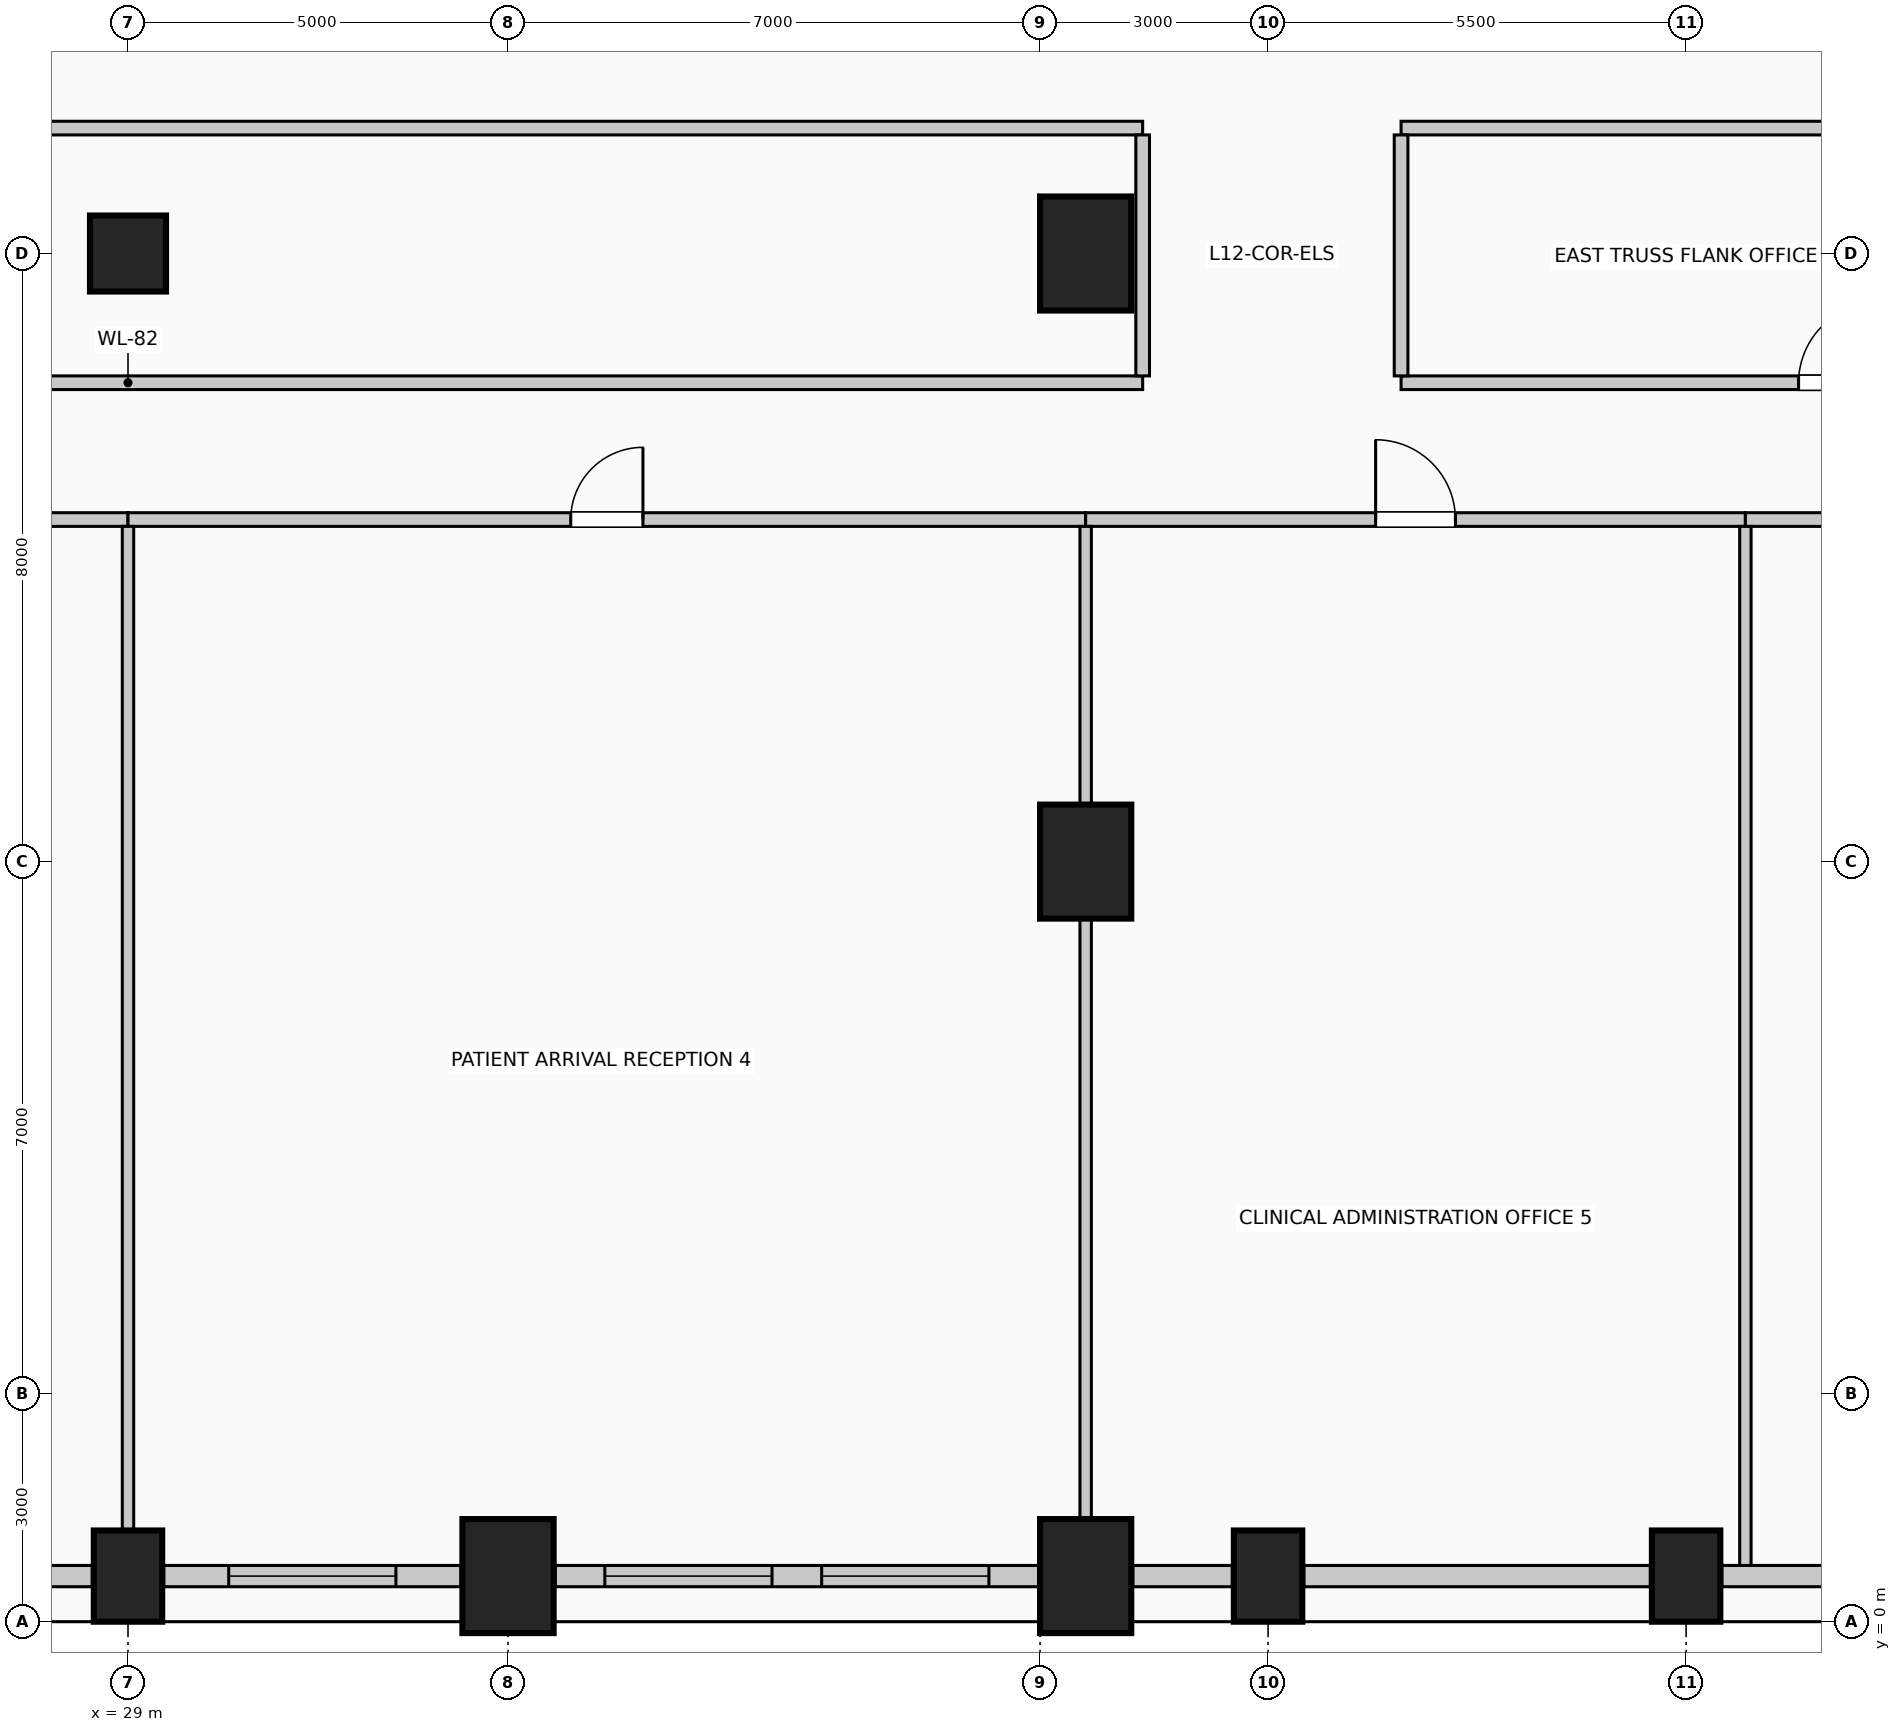
"""IFC4 building model, lengths in metres.
Left out: names, types, materials, properties, quantities, classifications, styles, units other than length and angle.
Written with IfcOpenShell. Run it as: python <this file> out.ifc"""

import sys

from ifc_helpers import new_model, si_unit, direction, frame, frame_2d, origin, origin_2d, place, context, subcontext, project, spatial, rectangle, circle, extrude, element, fill, save


model = new_model("IFC4")
c1 = context("Model", 3, precision=1e-05, world=origin(), true_north=direction((0.0, 1.0)))
c2 = subcontext(c1, "Body", "Model", "MODEL_VIEW")
j1 = project(units=[si_unit("LENGTHUNIT", "METRE"), si_unit("PLANEANGLEUNIT", "RADIAN")], contexts=[c1])
p1 = place(None, origin())
s1 = spatial("IfcSite", under=j1, at=p1, CompositionType="ELEMENT")
p2 = place(p1, origin())
s2 = spatial("IfcBuilding", under=s1, at=p2, CompositionType="ELEMENT")
p3 = place(p2, frame((0.0, 0.0, 50.6)))
s3 = spatial("IfcBuildingStorey", under=s2, at=p3, CompositionType="ELEMENT", Elevation=50.6)
p4 = place(p3, frame((29.0, 0.6, 0.0), z_axis=(0.0, 0.0, 1.0), x_axis=(1.0, 0.0, 0.0)))
e1 = element("IfcColumn", 1, at=p4, inside=s3, PredefinedType="COLUMN", context=c2, shape_type="SweptSolid", body=[
    extrude(rectangle(XDim=0.9, YDim=1.2, at=origin_2d()), origin(), (0.0, 0.0, 1.0), 4.0),
])
for number, where, z_axis, x_axis in (
    (2, (34.0, 0.6, 0.0), (0.0, 0.0, 1.0), (1.0, 0.0, 0.0)),
    (3, (41.6, 0.6, 0.0), (0.0, 0.0, 1.0), (1.0, 0.0, 0.0)),
):
    element("IfcColumn", number, at=place(p3, frame(where, z_axis=z_axis, x_axis=x_axis)), inside=s3, PredefinedType="COLUMN", context=c2, shape_type="SweptSolid", body=[
        extrude(rectangle(XDim=1.2, YDim=1.5, at=origin_2d()), origin(), (0.0, 0.0, 1.0), 4.0),
    ])
for number, where, z_axis, x_axis in (
    (4, (44.0, 0.6, 0.0), (0.0, 0.0, 1.0), (1.0, 0.0, 0.0)),
    (5, (49.5, 0.6, 0.0), (0.0, 0.0, 1.0), (1.0, 0.0, 0.0)),
):
    element("IfcColumn", number, at=place(p3, frame(where, z_axis=z_axis, x_axis=x_axis)), inside=s3, PredefinedType="COLUMN", context=c2, shape_type="SweptSolid", body=[
        extrude(rectangle(XDim=0.9, YDim=1.2, at=origin_2d()), origin(), (0.0, 0.0, 1.0), 4.0),
    ])
for number, where, z_axis, x_axis in (
    (6, (41.6, 10.0, 0.0), (0.0, 0.0, 1.0), (1.0, 0.0, 0.0)),
    (7, (41.6, 18.0, 0.0), (0.0, 0.0, 1.0), (1.0, 0.0, 0.0)),
):
    element("IfcColumn", number, at=place(p3, frame(where, z_axis=z_axis, x_axis=x_axis)), inside=s3, PredefinedType="COLUMN", context=c2, shape_type="SweptSolid", body=[
        extrude(rectangle(XDim=1.2, YDim=1.5, at=origin_2d()), origin(), (0.0, 0.0, 1.0), 4.0),
    ])
p5 = place(p3, frame((29.0, 18.0, 0.0), z_axis=(0.0, 0.0, 1.0), x_axis=(1.0, 0.0, 0.0)))
e8 = element("IfcColumn", 8, at=p5, inside=s3, PredefinedType="COLUMN", context=c2, shape_type="SweptSolid", body=[
    extrude(circle(Radius=0.5, at=origin_2d()), origin(), (0.0, 0.0, 1.0), 4.0),
])
p6 = place(p3, frame((28.53, 0.6, 0.0), z_axis=(0.0, 0.0, 1.0), x_axis=(-1.0, 0.0, 0.0)))
e9 = element("IfcWall", 9, at=p6, inside=s3, PredefinedType="SOLIDWALL", context=c2, shape_type="SweptSolid", body=[
    extrude(rectangle(XDim=3.91, YDim=0.28, at=frame_2d((1.955, 0.0))), origin(), (0.0, 0.0, 1.0), 2.85),
])
p7 = place(p6, frame((0.855, 0.0, 0.5)))
e10 = element("IfcOpeningElement", 10, at=p7, cuts=e9, PredefinedType="OPENING", context=c2, shape_type="SweptSolid", body=[
    extrude(rectangle(XDim=2.2, YDim=1.95, at=frame_2d((1.1, 0.975))), frame((0.0, 0.15, 0.0), z_axis=(0.0, -1.0, 0.0), x_axis=(1.0, 0.0, 0.0)), (0.0, 0.0, 1.0), 0.3),
])
p8 = place(p3, frame((33.38, 0.6, 0.0), z_axis=(0.0, 0.0, 1.0), x_axis=(-1.0, 0.0, 0.0)))
e11 = element("IfcWall", 11, at=p8, inside=s3, PredefinedType="SOLIDWALL", context=c2, shape_type="SweptSolid", body=[
    extrude(rectangle(XDim=3.91, YDim=0.28, at=frame_2d((1.955, 0.0))), origin(), (0.0, 0.0, 1.0), 2.85),
])
p9 = place(p8, frame((0.855, 0.0, 0.5)))
e12 = element("IfcOpeningElement", 12, at=p9, cuts=e11, PredefinedType="OPENING", context=c2, shape_type="SweptSolid", body=[
    extrude(rectangle(XDim=2.2, YDim=1.95, at=frame_2d((1.1, 0.975))), frame((0.0, 0.15, 0.0), z_axis=(0.0, -1.0, 0.0), x_axis=(1.0, 0.0, 0.0)), (0.0, 0.0, 1.0), 0.3),
])
p10 = place(p3, frame((40.98, 0.6, 0.0), z_axis=(0.0, 0.0, 1.0), x_axis=(-1.0, 0.0, 0.0)))
e13 = element("IfcWall", 13, at=p10, inside=s3, PredefinedType="SOLIDWALL", context=c2, shape_type="SweptSolid", body=[
    extrude(rectangle(XDim=6.36, YDim=0.28, at=frame_2d((3.18, 0.0))), origin(), (0.0, 0.0, 1.0), 2.85),
])
p11 = place(p10, frame((0.653, 0.0, 0.5)))
e14 = element("IfcOpeningElement", 14, at=p11, cuts=e13, PredefinedType="OPENING", context=c2, shape_type="SweptSolid", body=[
    extrude(rectangle(XDim=2.2, YDim=1.95, at=frame_2d((1.1, 0.975))), frame((0.0, 0.15, 0.0), z_axis=(0.0, -1.0, 0.0), x_axis=(1.0, 0.0, 0.0)), (0.0, 0.0, 1.0), 0.3),
])
p12 = place(p10, frame((3.507, 0.0, 0.5)))
e15 = element("IfcOpeningElement", 15, at=p12, cuts=e13, PredefinedType="OPENING", context=c2, shape_type="SweptSolid", body=[
    extrude(rectangle(XDim=2.2, YDim=1.95, at=frame_2d((1.1, 0.975))), frame((0.0, 0.15, 0.0), z_axis=(0.0, -1.0, 0.0), x_axis=(1.0, 0.0, 0.0)), (0.0, 0.0, 1.0), 0.3),
])
p13 = place(p3, frame((43.53, 0.6, 0.0), z_axis=(0.0, 0.0, 1.0), x_axis=(-1.0, 0.0, 0.0)))
e16 = element("IfcWall", 16, at=p13, inside=s3, PredefinedType="SOLIDWALL", context=c2, shape_type="SweptSolid", body=[
    extrude(rectangle(XDim=1.31, YDim=0.28, at=frame_2d((0.655, 0.0))), origin(), (0.0, 0.0, 1.0), 2.85),
])
p14 = place(p3, frame((49.03, 0.6, 0.0), z_axis=(0.0, 0.0, 1.0), x_axis=(-1.0, 0.0, 0.0)))
e17 = element("IfcWall", 17, at=p14, inside=s3, PredefinedType="SOLIDWALL", context=c2, shape_type="SweptSolid", body=[
    extrude(rectangle(XDim=4.56, YDim=0.28, at=frame_2d((2.28, 0.0))), origin(), (0.0, 0.0, 1.0), 2.85),
])
p15 = place(p3, frame((53.93, 0.6, 0.0), z_axis=(0.0, 0.0, 1.0), x_axis=(-1.0, 0.0, 0.0)))
e18 = element("IfcWall", 18, at=p15, inside=s3, PredefinedType="SOLIDWALL", context=c2, shape_type="SweptSolid", body=[
    extrude(rectangle(XDim=3.96, YDim=0.28, at=frame_2d((1.98, 0.0))), origin(), (0.0, 0.0, 1.0), 2.85),
])
p16 = place(p3, frame((17.48, 14.5, 0.0), z_axis=(0.0, 0.0, 1.0), x_axis=(1.0, 0.0, 0.0)))
e19 = element("IfcWall", 19, at=p16, inside=s3, PredefinedType="PARTITIONING", context=c2, shape_type="SweptSolid", body=[
    extrude(rectangle(XDim=11.52, YDim=0.18, at=frame_2d((5.76, 0.0))), origin(), (0.0, 0.0, 1.0), 3.7),
])
p17 = place(p16, frame((5.235, 0.0, 0.0)))
e20 = element("IfcOpeningElement", 20, at=p17, cuts=e19, PredefinedType="OPENING", context=c2, shape_type="SweptSolid", body=[
    extrude(rectangle(XDim=1.05, YDim=2.15, at=frame_2d((0.525, 1.075))), frame((0.0, 0.1, 0.0), z_axis=(0.0, -1.0, 0.0), x_axis=(1.0, 0.0, 0.0)), (0.0, 0.0, 1.0), 0.2),
])
p18 = place(p3, frame((29.0, 14.5, 0.0), z_axis=(0.0, 0.0, 1.0), x_axis=(1.0, 0.0, 0.0)))
e21 = element("IfcWall", 21, at=p18, inside=s3, PredefinedType="PARTITIONING", context=c2, shape_type="SweptSolid", body=[
    extrude(rectangle(XDim=12.6, YDim=0.18, at=frame_2d((6.3, 0.0))), origin(), (0.0, 0.0, 1.0), 3.7),
])
p19 = place(p18, frame((5.825, 0.0, 0.0)))
e22 = element("IfcOpeningElement", 22, at=p19, cuts=e21, PredefinedType="OPENING", context=c2, shape_type="SweptSolid", body=[
    extrude(rectangle(XDim=0.95, YDim=2.15, at=frame_2d((0.475, 1.075))), frame((0.0, 0.1, 0.0), z_axis=(0.0, -1.0, 0.0), x_axis=(1.0, 0.0, 0.0)), (0.0, 0.0, 1.0), 0.2),
])
p20 = place(p3, frame((41.6, 14.5, 0.0), z_axis=(0.0, 0.0, 1.0), x_axis=(1.0, 0.0, 0.0)))
e23 = element("IfcWall", 23, at=p20, inside=s3, PredefinedType="PARTITIONING", context=c2, shape_type="SweptSolid", body=[
    extrude(rectangle(XDim=8.68, YDim=0.18, at=frame_2d((4.34, 0.0))), origin(), (0.0, 0.0, 1.0), 3.7),
])
p21 = place(p20, frame((3.815, 0.0, 0.0)))
e24 = element("IfcOpeningElement", 24, at=p21, cuts=e23, PredefinedType="OPENING", context=c2, shape_type="SweptSolid", body=[
    extrude(rectangle(XDim=1.05, YDim=2.15, at=frame_2d((0.525, 1.075))), frame((0.0, 0.1, 0.0), z_axis=(0.0, -1.0, 0.0), x_axis=(1.0, 0.0, 0.0)), (0.0, 0.0, 1.0), 0.2),
])
p22 = place(p3, frame((50.28, 14.5, 0.0), z_axis=(0.0, 0.0, 1.0), x_axis=(1.0, 0.0, 0.0)))
e25 = element("IfcWall", 25, at=p22, inside=s3, PredefinedType="PARTITIONING", context=c2, shape_type="SweptSolid", body=[
    extrude(rectangle(XDim=6.98, YDim=0.18, at=frame_2d((3.49, 0.0))), origin(), (0.0, 0.0, 1.0), 3.7),
])
p23 = place(p22, frame((3.015, 0.0, 0.0)))
e26 = element("IfcOpeningElement", 26, at=p23, cuts=e25, PredefinedType="OPENING", context=c2, shape_type="SweptSolid", body=[
    extrude(rectangle(XDim=0.95, YDim=2.15, at=frame_2d((0.475, 1.075))), frame((0.0, 0.1, 0.0), z_axis=(0.0, -1.0, 0.0), x_axis=(1.0, 0.0, 0.0)), (0.0, 0.0, 1.0), 0.2),
])
p24 = place(p3, frame((15.65, 16.3, 0.0), z_axis=(0.0, 0.0, 1.0), x_axis=(1.0, 0.0, 0.0)))
e27 = element("IfcWall", 27, at=p24, inside=s3, PredefinedType="PARTITIONING", context=c2, shape_type="SweptSolid", body=[
    extrude(rectangle(XDim=26.7, YDim=0.18, at=frame_2d((13.35, 0.0))), origin(), (0.0, 0.0, 1.0), 3.7),
])
p25 = place(p3, frame((45.75, 16.3, 0.0), z_axis=(0.0, 0.0, 1.0), x_axis=(1.0, 0.0, 0.0)))
e28 = element("IfcWall", 28, at=p25, inside=s3, PredefinedType="PARTITIONING", context=c2, shape_type="SweptSolid", body=[
    extrude(rectangle(XDim=11.51, YDim=0.18, at=frame_2d((5.755, 0.0))), origin(), (0.0, 0.0, 1.0), 3.7),
])
p26 = place(p25, frame((5.23, 0.0, 0.0)))
e29 = element("IfcOpeningElement", 29, at=p26, cuts=e28, PredefinedType="OPENING", context=c2, shape_type="SweptSolid", body=[
    extrude(rectangle(XDim=1.05, YDim=2.15, at=frame_2d((0.525, 1.075))), frame((0.0, 0.1, 0.0), z_axis=(0.0, -1.0, 0.0), x_axis=(1.0, 0.0, 0.0)), (0.0, 0.0, 1.0), 0.2),
])
p27 = place(p3, frame((15.65, 19.65, 0.0), z_axis=(0.0, 0.0, 1.0), x_axis=(1.0, 0.0, 0.0)))
e30 = element("IfcWall", 30, at=p27, inside=s3, PredefinedType="PARTITIONING", context=c2, shape_type="SweptSolid", body=[
    extrude(rectangle(XDim=26.7, YDim=0.18, at=frame_2d((13.35, 0.0))), origin(), (0.0, 0.0, 1.0), 3.7),
])
p28 = place(p3, frame((45.75, 19.65, 0.0), z_axis=(0.0, 0.0, 1.0), x_axis=(1.0, 0.0, 0.0)))
e31 = element("IfcWall", 31, at=p28, inside=s3, PredefinedType="PARTITIONING", context=c2, shape_type="SweptSolid", body=[
    extrude(rectangle(XDim=11.51, YDim=0.18, at=frame_2d((5.755, 0.0))), origin(), (0.0, 0.0, 1.0), 3.7),
])
p29 = place(p3, frame((29.0, 1.2, 0.0), z_axis=(0.0, 0.0, 1.0), x_axis=(0.0, 1.0, 0.0)))
e32 = element("IfcWall", 32, at=p29, inside=s3, PredefinedType="PARTITIONING", context=c2, shape_type="SweptSolid", body=[
    extrude(rectangle(XDim=13.21, YDim=0.15, at=frame_2d((6.605, 0.0))), origin(), (0.0, 0.0, 1.0), 2.995),
])
p30 = place(p3, frame((41.6, 1.35, 0.0), z_axis=(0.0, 0.0, 1.0), x_axis=(0.0, 1.0, 0.0)))
e33 = element("IfcWall", 33, at=p30, inside=s3, PredefinedType="PARTITIONING", context=c2, shape_type="SweptSolid", body=[
    extrude(rectangle(XDim=7.9, YDim=0.15, at=frame_2d((3.95, 0.0))), origin(), (0.0, 0.0, 1.0), 2.995),
])
p31 = place(p3, frame((41.6, 10.75, 0.0), z_axis=(0.0, 0.0, 1.0), x_axis=(0.0, 1.0, 0.0)))
e34 = element("IfcWall", 34, at=p31, inside=s3, PredefinedType="PARTITIONING", context=c2, shape_type="SweptSolid", body=[
    extrude(rectangle(XDim=3.66, YDim=0.15, at=frame_2d((1.83, 0.0))), origin(), (0.0, 0.0, 1.0), 2.995),
])
for number, where, z_axis, x_axis in (
    (35, (42.35, 16.39, 0.0), (0.0, 0.0, 1.0), (0.0, 1.0, 0.0)),
    (36, (45.75, 16.39, 0.0), (0.0, 0.0, 1.0), (0.0, 1.0, 0.0)),
):
    element("IfcWall", number, at=place(p3, frame(where, z_axis=z_axis, x_axis=x_axis)), inside=s3, PredefinedType="PARTITIONING", context=c2, shape_type="SweptSolid", body=[
        extrude(rectangle(XDim=3.17, YDim=0.18, at=frame_2d((1.585, 0.0))), origin(), (0.0, 0.0, 1.0), 3.7),
    ])
p32 = place(p3, frame((50.28, 0.74, 0.0), z_axis=(0.0, 0.0, 1.0), x_axis=(0.0, 1.0, 0.0)))
e37 = element("IfcWall", 37, at=p32, inside=s3, PredefinedType="PARTITIONING", context=c2, shape_type="SweptSolid", body=[
    extrude(rectangle(XDim=13.67, YDim=0.15, at=frame_2d((6.835, 0.0))), origin(), (0.0, 0.0, 1.0), 3.7),
])
p33 = place(p9, origin())
e38 = element("IfcWindow", 38, at=p33, inside=s3, PartitioningType="SINGLE_PANEL", PredefinedType="WINDOW", context=c2, shape_type="SweptSolid", body=[
    extrude(rectangle(XDim=2.2, YDim=1.95, at=frame_2d((1.1, 0.975))), frame((0.0, 0.03, 0.0), z_axis=(0.0, -1.0, 0.0), x_axis=(1.0, 0.0, 0.0)), (0.0, 0.0, 1.0), 0.06),
])
fill(e12, e38)
p34 = place(p11, origin())
e39 = element("IfcWindow", 39, at=p34, inside=s3, PartitioningType="SINGLE_PANEL", PredefinedType="WINDOW", context=c2, shape_type="SweptSolid", body=[
    extrude(rectangle(XDim=2.2, YDim=1.95, at=frame_2d((1.1, 0.975))), frame((0.0, 0.03, 0.0), z_axis=(0.0, -1.0, 0.0), x_axis=(1.0, 0.0, 0.0)), (0.0, 0.0, 1.0), 0.06),
])
fill(e14, e39)
p35 = place(p12, origin())
e40 = element("IfcWindow", 40, at=p35, inside=s3, PartitioningType="SINGLE_PANEL", PredefinedType="WINDOW", context=c2, shape_type="SweptSolid", body=[
    extrude(rectangle(XDim=2.2, YDim=1.95, at=frame_2d((1.1, 0.975))), frame((0.0, 0.03, 0.0), z_axis=(0.0, -1.0, 0.0), x_axis=(1.0, 0.0, 0.0)), (0.0, 0.0, 1.0), 0.06),
])
fill(e15, e40)
p36 = place(p19, origin())
e41 = element("IfcDoor", 41, at=p36, inside=s3, OperationType="SINGLE_SWING_RIGHT", PredefinedType="DOOR", context=c2, shape_type="SweptSolid", body=[
    extrude(rectangle(XDim=0.95, YDim=2.15, at=frame_2d((0.475, 1.075))), frame((0.0, 0.025, 0.0), z_axis=(0.0, -1.0, 0.0), x_axis=(1.0, 0.0, 0.0)), (0.0, 0.0, 1.0), 0.05),
])
fill(e22, e41)
p37 = place(p21, origin())
e42 = element("IfcDoor", 42, at=p37, inside=s3, OperationType="SINGLE_SWING_LEFT", PredefinedType="DOOR", context=c2, shape_type="SweptSolid", body=[
    extrude(rectangle(XDim=1.05, YDim=2.15, at=frame_2d((0.525, 1.075))), frame((0.0, 0.025, 0.0), z_axis=(0.0, -1.0, 0.0), x_axis=(1.0, 0.0, 0.0)), (0.0, 0.0, 1.0), 0.05),
])
fill(e24, e42)
p38 = place(p26, origin())
e43 = element("IfcDoor", 43, at=p38, inside=s3, OperationType="SINGLE_SWING_RIGHT", PredefinedType="DOOR", context=c2, shape_type="SweptSolid", body=[
    extrude(rectangle(XDim=1.05, YDim=2.15, at=frame_2d((0.525, 1.075))), frame((0.0, 0.025, 0.0), z_axis=(0.0, -1.0, 0.0), x_axis=(1.0, 0.0, 0.0)), (0.0, 0.0, 1.0), 0.05),
])
fill(e29, e43)
save(model, sys.argv[1])
